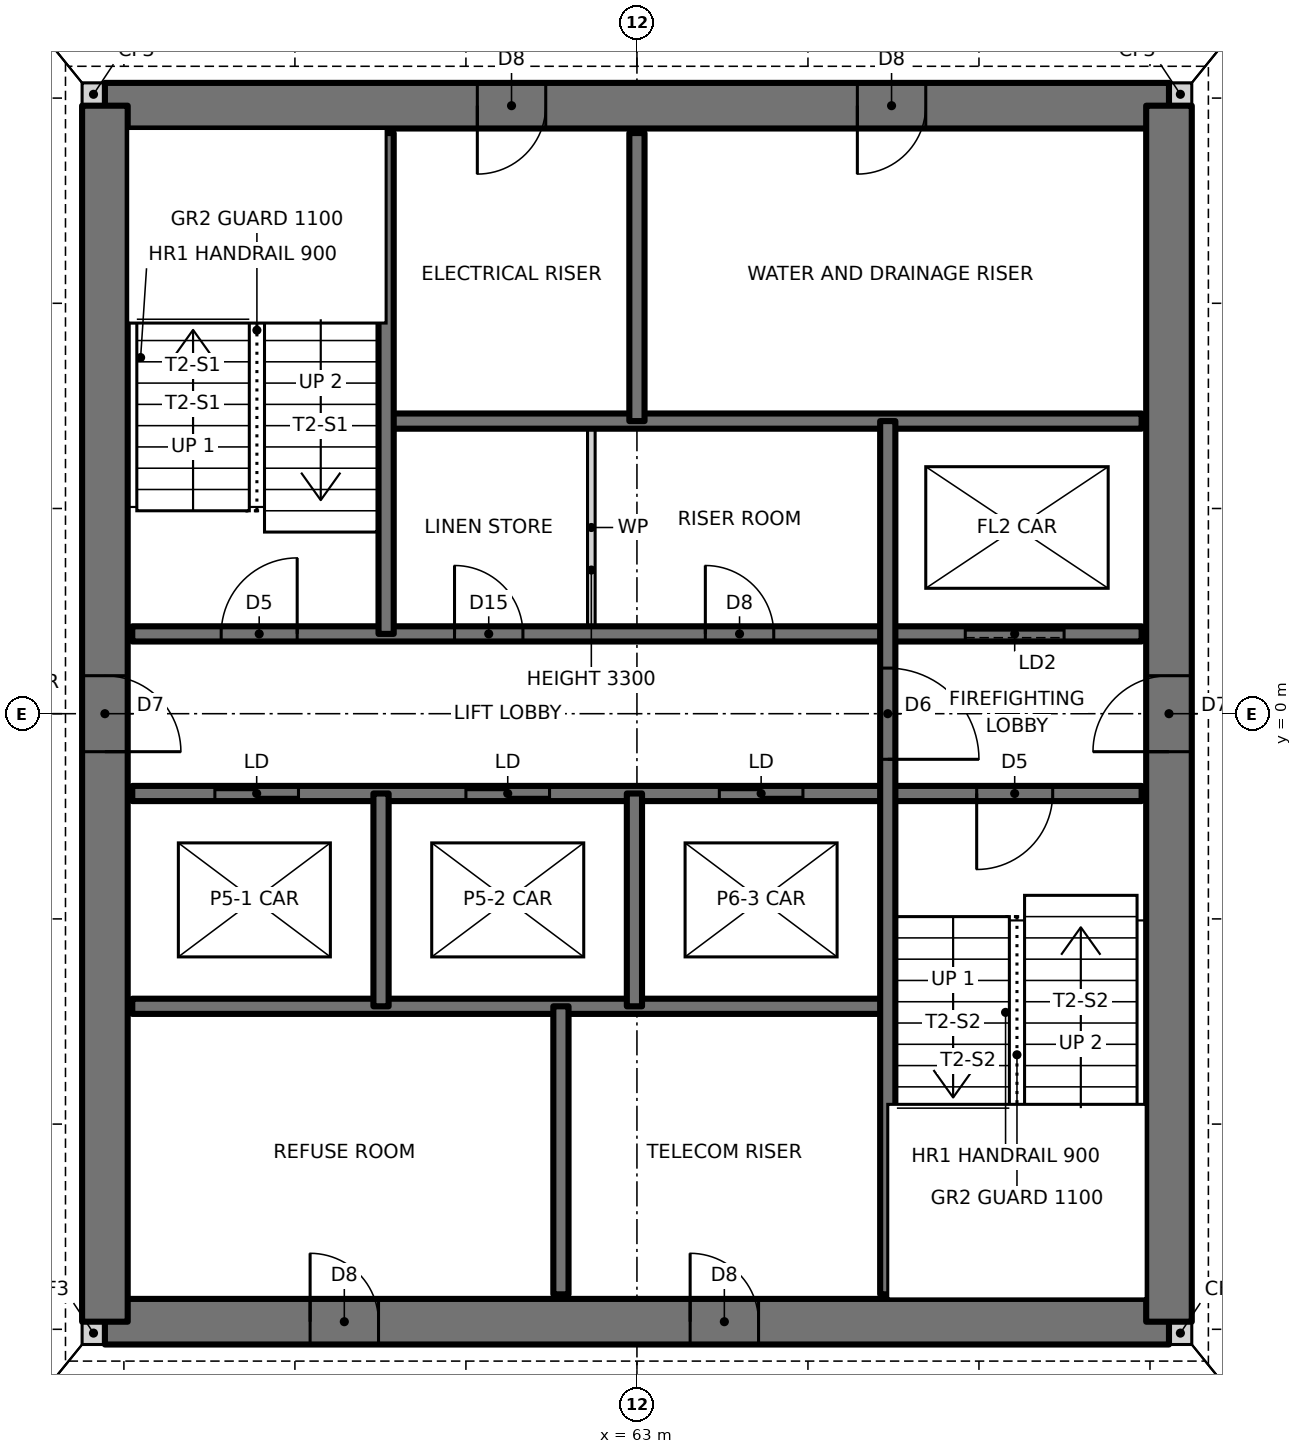
"""IFC4 building model, lengths in metres.
Left out: names, types, materials, properties, quantities, classifications, styles, units other than length and angle.
Written with IfcOpenShell. Run it as: python <this file> out.ifc"""

import sys

from ifc_helpers import new_model, si_unit, direction, frame, frame_2d, origin, place, context, subcontext, project, spatial, rectangle, extrude, element, fill, save


model = new_model("IFC4")
c1 = context("Model", 3, precision=1e-05, world=origin(), true_north=direction((0.0, 1.0)))
c2 = subcontext(c1, "Body", "Model", "MODEL_VIEW")
j1 = project(units=[si_unit("LENGTHUNIT", "METRE"), si_unit("PLANEANGLEUNIT", "RADIAN")], contexts=[c1])
p1 = place(None, origin())
s1 = spatial("IfcSite", under=j1, at=p1, CompositionType="ELEMENT")
p2 = place(p1, origin())
s2 = spatial("IfcBuilding", under=s1, at=p2, CompositionType="ELEMENT")
p3 = place(p2, frame((0.0, 0.0, 126.0)))
s3 = spatial("IfcBuildingStorey", under=s2, at=p3, CompositionType="ELEMENT", Elevation=126.0)
for number, where, z_axis, x_axis in (
    (1, (55.7, -8.15, 0.0), (0.0, 0.0, 1.0), (1.0, 0.0, 0.0)),
    (2, (70.0, -8.15, 0.0), (0.0, 0.0, 1.0), (1.0, 0.0, 0.0)),
    (3, (70.0, 8.15, 0.0), (0.0, 0.0, 1.0), (1.0, 0.0, 0.0)),
    (4, (55.7, 8.15, 0.0), (0.0, 0.0, 1.0), (1.0, 0.0, 0.0)),
):
    element("IfcWall", number, at=place(p3, frame(where, z_axis=z_axis, x_axis=x_axis)), inside=s3, PredefinedType="SOLIDWALL", context=c2, shape_type="SweptSolid", body=[
        extrude(rectangle(XDim=0.3, YDim=0.3, at=frame_2d((0.15, 0.0))), origin(), (0.0, 0.0, 1.0), 3.5),
    ])
p4 = place(p3, frame((56.0, -8.0, 0.0), z_axis=(0.0, 0.0, 1.0), x_axis=(1.0, 0.0, 0.0)))
e5 = element("IfcWall", 5, at=p4, inside=s3, PredefinedType="SHEAR", context=c2, shape_type="SweptSolid", body=[
    extrude(rectangle(XDim=14.0, YDim=0.6, at=frame_2d((7.0, 0.0))), origin(), (0.0, 0.0, 1.0), 3.5),
])
p5 = place(p4, frame((2.7, 0.0, 0.0)))
e6 = element("IfcOpeningElement", 6, at=p5, cuts=e5, PredefinedType="OPENING", context=c2, shape_type="SweptSolid", body=[
    extrude(rectangle(XDim=0.9, YDim=2.1, at=frame_2d((0.45, 1.05))), frame((0.0, 0.31, 0.0), z_axis=(0.0, -1.0, 0.0), x_axis=(1.0, 0.0, 0.0)), (0.0, 0.0, 1.0), 0.62),
])
p6 = place(p4, frame((7.7, 0.0, 0.0)))
e7 = element("IfcOpeningElement", 7, at=p6, cuts=e5, PredefinedType="OPENING", context=c2, shape_type="SweptSolid", body=[
    extrude(rectangle(XDim=0.9, YDim=2.1, at=frame_2d((0.45, 1.05))), frame((0.0, 0.31, 0.0), z_axis=(0.0, -1.0, 0.0), x_axis=(1.0, 0.0, 0.0)), (0.0, 0.0, 1.0), 0.62),
])
p7 = place(p3, frame((70.0, 8.0, 0.0), z_axis=(0.0, 0.0, 1.0), x_axis=(-1.0, 0.0, 0.0)))
e8 = element("IfcWall", 8, at=p7, inside=s3, PredefinedType="SHEAR", context=c2, shape_type="SweptSolid", body=[
    extrude(rectangle(XDim=14.0, YDim=0.6, at=frame_2d((7.0, 0.0))), origin(), (0.0, 0.0, 1.0), 3.5),
])
p8 = place(p7, frame((8.2, 0.0, 0.0)))
e9 = element("IfcOpeningElement", 9, at=p8, cuts=e8, PredefinedType="OPENING", context=c2, shape_type="SweptSolid", body=[
    extrude(rectangle(XDim=0.9, YDim=2.1, at=frame_2d((0.45, 1.05))), frame((0.0, 0.31, 0.0), z_axis=(0.0, -1.0, 0.0), x_axis=(1.0, 0.0, 0.0)), (0.0, 0.0, 1.0), 0.62),
])
p9 = place(p7, frame((3.2, 0.0, 0.0)))
e10 = element("IfcOpeningElement", 10, at=p9, cuts=e8, PredefinedType="OPENING", context=c2, shape_type="SweptSolid", body=[
    extrude(rectangle(XDim=0.9, YDim=2.1, at=frame_2d((0.45, 1.05))), frame((0.0, 0.31, 0.0), z_axis=(0.0, -1.0, 0.0), x_axis=(1.0, 0.0, 0.0)), (0.0, 0.0, 1.0), 0.62),
])
p10 = place(p3, frame((70.0, -8.0, 0.0), z_axis=(0.0, 0.0, 1.0), x_axis=(0.0, 1.0, 0.0)))
e11 = element("IfcWall", 11, at=p10, inside=s3, PredefinedType="SHEAR", context=c2, shape_type="SweptSolid", body=[
    extrude(rectangle(XDim=16.0, YDim=0.6, at=frame_2d((8.0, 0.0))), origin(), (0.0, 0.0, 1.0), 3.5),
])
p11 = place(p10, frame((7.5, 0.0, 0.0)))
e12 = element("IfcOpeningElement", 12, at=p11, cuts=e11, PredefinedType="OPENING", context=c2, shape_type="SweptSolid", body=[
    extrude(rectangle(XDim=1.0, YDim=2.1, at=frame_2d((0.5, 1.05))), frame((0.0, 0.31, 0.0), z_axis=(0.0, -1.0, 0.0), x_axis=(1.0, 0.0, 0.0)), (0.0, 0.0, 1.0), 0.62),
])
p12 = place(p3, frame((56.0, 8.0, 0.0), z_axis=(0.0, 0.0, 1.0), x_axis=(0.0, -1.0, 0.0)))
e13 = element("IfcWall", 13, at=p12, inside=s3, PredefinedType="SHEAR", context=c2, shape_type="SweptSolid", body=[
    extrude(rectangle(XDim=16.0, YDim=0.6, at=frame_2d((8.0, 0.0))), origin(), (0.0, 0.0, 1.0), 3.5),
])
p13 = place(p12, frame((7.5, 0.0, 0.0)))
e14 = element("IfcOpeningElement", 14, at=p13, cuts=e13, PredefinedType="OPENING", context=c2, shape_type="SweptSolid", body=[
    extrude(rectangle(XDim=1.0, YDim=2.1, at=frame_2d((0.5, 1.05))), frame((0.0, 0.31, 0.0), z_axis=(0.0, -1.0, 0.0), x_axis=(1.0, 0.0, 0.0)), (0.0, 0.0, 1.0), 0.62),
])
p14 = place(p3, frame((56.36, -3.85, 0.0), z_axis=(0.0, 0.0, 1.0), x_axis=(1.0, 0.0, 0.0)))
e15 = element("IfcWall", 15, at=p14, inside=s3, PredefinedType="SOLIDWALL", context=c2, shape_type="SweptSolid", body=[
    extrude(rectangle(XDim=9.94, YDim=0.2, at=frame_2d((4.97, 0.0))), origin(), (0.0, 0.0, 1.0), 3.5),
])
p15 = place(p3, frame((56.36, -1.05, 0.0), z_axis=(0.0, 0.0, 1.0), x_axis=(1.0, 0.0, 0.0)))
e16 = element("IfcWall", 16, at=p15, inside=s3, PredefinedType="SOLIDWALL", context=c2, shape_type="SweptSolid", body=[
    extrude(rectangle(XDim=13.28, YDim=0.2, at=frame_2d((6.64, 0.0))), origin(), (0.0, 0.0, 1.0), 3.5),
])
p16 = place(p15, frame((11.11, 0.0, 0.0)))
e17 = element("IfcOpeningElement", 17, at=p16, cuts=e16, PredefinedType="OPENING", context=c2, shape_type="SweptSolid", body=[
    extrude(rectangle(XDim=1.0, YDim=2.1, at=frame_2d((0.5, 1.05))), frame((0.0, 0.11, 0.0), z_axis=(0.0, -1.0, 0.0), x_axis=(1.0, 0.0, 0.0)), (0.0, 0.0, 1.0), 0.22),
])
p17 = place(p15, frame((1.087, 0.0, 0.0)))
e18 = element("IfcOpeningElement", 18, at=p17, cuts=e16, PredefinedType="OPENING", context=c2, shape_type="SweptSolid", body=[
    extrude(rectangle(XDim=1.1, YDim=2.1, at=frame_2d((0.55, 1.05))), frame((0.0, 0.11, 0.0), z_axis=(0.0, -1.0, 0.0), x_axis=(1.0, 0.0, 0.0)), (0.0, 0.0, 1.0), 0.22),
])
p18 = place(p15, frame((4.39, 0.0, 0.0)))
e19 = element("IfcOpeningElement", 19, at=p18, cuts=e16, PredefinedType="OPENING", context=c2, shape_type="SweptSolid", body=[
    extrude(rectangle(XDim=1.1, YDim=2.1, at=frame_2d((0.55, 1.05))), frame((0.0, 0.11, 0.0), z_axis=(0.0, -1.0, 0.0), x_axis=(1.0, 0.0, 0.0)), (0.0, 0.0, 1.0), 0.22),
])
p19 = place(p15, frame((7.724, 0.0, 0.0)))
e20 = element("IfcOpeningElement", 20, at=p19, cuts=e16, PredefinedType="OPENING", context=c2, shape_type="SweptSolid", body=[
    extrude(rectangle(XDim=1.1, YDim=2.1, at=frame_2d((0.55, 1.05))), frame((0.0, 0.11, 0.0), z_axis=(0.0, -1.0, 0.0), x_axis=(1.0, 0.0, 0.0)), (0.0, 0.0, 1.0), 0.22),
])
p20 = place(p3, frame((56.36, 1.05, 0.0), z_axis=(0.0, 0.0, 1.0), x_axis=(1.0, 0.0, 0.0)))
e21 = element("IfcWall", 21, at=p20, inside=s3, PredefinedType="SOLIDWALL", context=c2, shape_type="SweptSolid", body=[
    extrude(rectangle(XDim=13.28, YDim=0.2, at=frame_2d((6.64, 0.0))), origin(), (0.0, 0.0, 1.0), 3.5),
])
p21 = place(p20, frame((1.17, 0.0, 0.0)))
e22 = element("IfcOpeningElement", 22, at=p21, cuts=e21, PredefinedType="OPENING", context=c2, shape_type="SweptSolid", body=[
    extrude(rectangle(XDim=1.0, YDim=2.1, at=frame_2d((0.5, 1.05))), frame((0.0, 0.11, 0.0), z_axis=(0.0, -1.0, 0.0), x_axis=(1.0, 0.0, 0.0)), (0.0, 0.0, 1.0), 0.22),
])
p22 = place(p20, frame((7.54, 0.0, 0.0)))
e23 = element("IfcOpeningElement", 23, at=p22, cuts=e21, PredefinedType="OPENING", context=c2, shape_type="SweptSolid", body=[
    extrude(rectangle(XDim=0.9, YDim=2.1, at=frame_2d((0.45, 1.05))), frame((0.0, 0.11, 0.0), z_axis=(0.0, -1.0, 0.0), x_axis=(1.0, 0.0, 0.0)), (0.0, 0.0, 1.0), 0.22),
])
p23 = place(p20, frame((4.24, 0.0, 0.0)))
e24 = element("IfcOpeningElement", 24, at=p23, cuts=e21, PredefinedType="OPENING", context=c2, shape_type="SweptSolid", body=[
    extrude(rectangle(XDim=0.9, YDim=2.1, at=frame_2d((0.45, 1.05))), frame((0.0, 0.11, 0.0), z_axis=(0.0, -1.0, 0.0), x_axis=(1.0, 0.0, 0.0)), (0.0, 0.0, 1.0), 0.22),
])
p24 = place(p20, frame((10.96, 0.0, 0.0)))
e25 = element("IfcOpeningElement", 25, at=p24, cuts=e21, PredefinedType="OPENING", context=c2, shape_type="SweptSolid", body=[
    extrude(rectangle(XDim=1.3, YDim=2.1, at=frame_2d((0.65, 1.05))), frame((0.0, 0.11, 0.0), z_axis=(0.0, -1.0, 0.0), x_axis=(1.0, 0.0, 0.0)), (0.0, 0.0, 1.0), 0.22),
])
p25 = place(p3, frame((59.7, 3.85, 0.0), z_axis=(0.0, 0.0, 1.0), x_axis=(1.0, 0.0, 0.0)))
e26 = element("IfcWall", 26, at=p25, inside=s3, PredefinedType="SOLIDWALL", context=c2, shape_type="SweptSolid", body=[
    extrude(rectangle(XDim=9.94, YDim=0.2, at=frame_2d((4.97, 0.0))), origin(), (0.0, 0.0, 1.0), 3.5),
])
p26 = place(p3, frame((66.3, -7.64, 0.0), z_axis=(0.0, 0.0, 1.0), x_axis=(0.0, 1.0, 0.0)))
e27 = element("IfcWall", 27, at=p26, inside=s3, PredefinedType="SOLIDWALL", context=c2, shape_type="SweptSolid", body=[
    extrude(rectangle(XDim=11.49, YDim=0.2, at=frame_2d((5.745, 0.0))), origin(), (0.0, 0.0, 1.0), 3.5),
])
p27 = place(p26, frame((7.04, 0.0, 0.0)))
e28 = element("IfcOpeningElement", 28, at=p27, cuts=e27, PredefinedType="OPENING", context=c2, shape_type="SweptSolid", body=[
    extrude(rectangle(XDim=1.2, YDim=2.1, at=frame_2d((0.6, 1.05))), frame((0.0, 0.11, 0.0), z_axis=(0.0, -1.0, 0.0), x_axis=(1.0, 0.0, 0.0)), (0.0, 0.0, 1.0), 0.22),
])
p28 = place(p3, frame((63.0, 3.85, 0.0), z_axis=(0.0, 0.0, 1.0), x_axis=(0.0, 1.0, 0.0)))
e29 = element("IfcWall", 29, at=p28, inside=s3, PredefinedType="SOLIDWALL", context=c2, shape_type="SweptSolid", body=[
    extrude(rectangle(XDim=3.79, YDim=0.2, at=frame_2d((1.895, 0.0))), origin(), (0.0, 0.0, 1.0), 3.5),
])
p29 = place(p3, frame((62.967, -3.85, 0.0), z_axis=(0.0, 0.0, 1.0), x_axis=(0.0, 1.0, 0.0)))
e30 = element("IfcWall", 30, at=p29, inside=s3, PredefinedType="SOLIDWALL", context=c2, shape_type="SweptSolid", body=[
    extrude(rectangle(XDim=2.8, YDim=0.2, at=frame_2d((1.4, 0.0))), origin(), (0.0, 0.0, 1.0), 3.5),
])
p30 = place(p3, frame((62.4, 1.05, 0.0), z_axis=(0.0, 0.0, 1.0), x_axis=(0.0, 1.0, 0.0)))
e31 = element("IfcWall", 31, at=p30, inside=s3, PredefinedType="PARTITIONING", context=c2, shape_type="SweptSolid", body=[
    extrude(rectangle(XDim=2.8, YDim=0.1, at=frame_2d((1.4, 0.0))), origin(), (0.0, 0.0, 1.0), 3.3),
])
p31 = place(p3, frame((62.0, -7.64, 0.0), z_axis=(0.0, 0.0, 1.0), x_axis=(0.0, 1.0, 0.0)))
e32 = element("IfcWall", 32, at=p31, inside=s3, PredefinedType="SOLIDWALL", context=c2, shape_type="SweptSolid", body=[
    extrude(rectangle(XDim=3.79, YDim=0.2, at=frame_2d((1.895, 0.0))), origin(), (0.0, 0.0, 1.0), 3.5),
])
p32 = place(p3, frame((59.7, 1.05, 0.0), z_axis=(0.0, 0.0, 1.0), x_axis=(0.0, 1.0, 0.0)))
e33 = element("IfcWall", 33, at=p32, inside=s3, PredefinedType="SOLIDWALL", context=c2, shape_type="SweptSolid", body=[
    extrude(rectangle(XDim=6.59, YDim=0.2, at=frame_2d((3.295, 0.0))), origin(), (0.0, 0.0, 1.0), 3.5),
])
p33 = place(p3, frame((59.633, -3.85, 0.0), z_axis=(0.0, 0.0, 1.0), x_axis=(0.0, 1.0, 0.0)))
e34 = element("IfcWall", 34, at=p33, inside=s3, PredefinedType="SOLIDWALL", context=c2, shape_type="SweptSolid", body=[
    extrude(rectangle(XDim=2.8, YDim=0.2, at=frame_2d((1.4, 0.0))), origin(), (0.0, 0.0, 1.0), 3.5),
])
p34 = place(p21, origin())
e35 = element("IfcDoor", 35, at=p34, inside=s3, OperationType="SINGLE_SWING_RIGHT", PredefinedType="DOOR", context=c2, shape_type="SweptSolid", body=[
    extrude(rectangle(XDim=1.0, YDim=2.1, at=frame_2d((0.5, 1.05))), frame((0.0, 0.025, 0.0), z_axis=(0.0, -1.0, 0.0), x_axis=(1.0, 0.0, 0.0)), (0.0, 0.0, 1.0), 0.05),
])
fill(e22, e35)
p35 = place(p16, frame((1.0, 0.0, 0.0), z_axis=(0.0, 0.0, 1.0), x_axis=(-1.0, 0.0, 0.0)))
e36 = element("IfcDoor", 36, at=p35, inside=s3, OperationType="SINGLE_SWING_RIGHT", PredefinedType="DOOR", context=c2, shape_type="SweptSolid", body=[
    extrude(rectangle(XDim=1.0, YDim=2.1, at=frame_2d((0.5, 1.05))), frame((0.0, 0.025, 0.0), z_axis=(0.0, -1.0, 0.0), x_axis=(1.0, 0.0, 0.0)), (0.0, 0.0, 1.0), 0.05),
])
fill(e17, e36)
p36 = place(p27, frame((1.2, 0.0, 0.0), z_axis=(0.0, 0.0, 1.0), x_axis=(-1.0, 0.0, 0.0)))
e37 = element("IfcDoor", 37, at=p36, inside=s3, OperationType="SINGLE_SWING_RIGHT", PredefinedType="DOOR", context=c2, shape_type="SweptSolid", body=[
    extrude(rectangle(XDim=1.2, YDim=2.1, at=frame_2d((0.6, 1.05))), frame((0.0, 0.025, 0.0), z_axis=(0.0, -1.0, 0.0), x_axis=(1.0, 0.0, 0.0)), (0.0, 0.0, 1.0), 0.05),
])
fill(e28, e37)
p37 = place(p22, origin())
e38 = element("IfcDoor", 38, at=p37, inside=s3, OperationType="SINGLE_SWING_LEFT", PredefinedType="DOOR", context=c2, shape_type="SweptSolid", body=[
    extrude(rectangle(XDim=0.9, YDim=2.1, at=frame_2d((0.45, 1.05))), frame((0.0, 0.025, 0.0), z_axis=(0.0, -1.0, 0.0), x_axis=(1.0, 0.0, 0.0)), (0.0, 0.0, 1.0), 0.05),
])
fill(e23, e38)
p38 = place(p23, origin())
e39 = element("IfcDoor", 39, at=p38, inside=s3, OperationType="SINGLE_SWING_LEFT", PredefinedType="DOOR", context=c2, shape_type="SweptSolid", body=[
    extrude(rectangle(XDim=0.9, YDim=2.1, at=frame_2d((0.45, 1.05))), frame((0.0, 0.025, 0.0), z_axis=(0.0, -1.0, 0.0), x_axis=(1.0, 0.0, 0.0)), (0.0, 0.0, 1.0), 0.05),
])
fill(e24, e39)
p39 = place(p13, origin())
e40 = element("IfcDoor", 40, at=p39, inside=s3, OperationType="SINGLE_SWING_RIGHT", PredefinedType="DOOR", context=c2, shape_type="SweptSolid", body=[
    extrude(rectangle(XDim=1.0, YDim=2.1, at=frame_2d((0.5, 1.05))), frame((0.0, 0.025, 0.0), z_axis=(0.0, -1.0, 0.0), x_axis=(1.0, 0.0, 0.0)), (0.0, 0.0, 1.0), 0.05),
])
fill(e14, e40)
p40 = place(p11, origin())
e41 = element("IfcDoor", 41, at=p40, inside=s3, OperationType="SINGLE_SWING_LEFT", PredefinedType="DOOR", context=c2, shape_type="SweptSolid", body=[
    extrude(rectangle(XDim=1.0, YDim=2.1, at=frame_2d((0.5, 1.05))), frame((0.0, 0.025, 0.0), z_axis=(0.0, -1.0, 0.0), x_axis=(1.0, 0.0, 0.0)), (0.0, 0.0, 1.0), 0.05),
])
fill(e12, e41)
p41 = place(p8, origin())
e42 = element("IfcDoor", 42, at=p41, inside=s3, OperationType="SINGLE_SWING_RIGHT", PredefinedType="DOOR", context=c2, shape_type="SweptSolid", body=[
    extrude(rectangle(XDim=0.9, YDim=2.1, at=frame_2d((0.45, 1.05))), frame((0.0, 0.025, 0.0), z_axis=(0.0, -1.0, 0.0), x_axis=(1.0, 0.0, 0.0)), (0.0, 0.0, 1.0), 0.05),
])
fill(e9, e42)
p42 = place(p9, origin())
e43 = element("IfcDoor", 43, at=p42, inside=s3, OperationType="SINGLE_SWING_RIGHT", PredefinedType="DOOR", context=c2, shape_type="SweptSolid", body=[
    extrude(rectangle(XDim=0.9, YDim=2.1, at=frame_2d((0.45, 1.05))), frame((0.0, 0.025, 0.0), z_axis=(0.0, -1.0, 0.0), x_axis=(1.0, 0.0, 0.0)), (0.0, 0.0, 1.0), 0.05),
])
fill(e10, e43)
p43 = place(p5, origin())
e44 = element("IfcDoor", 44, at=p43, inside=s3, OperationType="SINGLE_SWING_LEFT", PredefinedType="DOOR", context=c2, shape_type="SweptSolid", body=[
    extrude(rectangle(XDim=0.9, YDim=2.1, at=frame_2d((0.45, 1.05))), frame((0.0, 0.025, 0.0), z_axis=(0.0, -1.0, 0.0), x_axis=(1.0, 0.0, 0.0)), (0.0, 0.0, 1.0), 0.05),
])
fill(e6, e44)
p44 = place(p6, origin())
e45 = element("IfcDoor", 45, at=p44, inside=s3, OperationType="SINGLE_SWING_LEFT", PredefinedType="DOOR", context=c2, shape_type="SweptSolid", body=[
    extrude(rectangle(XDim=0.9, YDim=2.1, at=frame_2d((0.45, 1.05))), frame((0.0, 0.025, 0.0), z_axis=(0.0, -1.0, 0.0), x_axis=(1.0, 0.0, 0.0)), (0.0, 0.0, 1.0), 0.05),
])
fill(e7, e45)
p45 = place(p17, origin())
e46 = element("IfcDoor", 46, at=p45, inside=s3, OperationType="DOUBLE_DOOR_SLIDING", PredefinedType="DOOR", context=c2, shape_type="SweptSolid", body=[
    extrude(rectangle(XDim=1.1, YDim=2.1, at=frame_2d((0.55, 1.05))), frame((0.0, 0.025, 0.0), z_axis=(0.0, -1.0, 0.0), x_axis=(1.0, 0.0, 0.0)), (0.0, 0.0, 1.0), 0.05),
])
fill(e18, e46)
p46 = place(p18, origin())
e47 = element("IfcDoor", 47, at=p46, inside=s3, OperationType="DOUBLE_DOOR_SLIDING", PredefinedType="DOOR", context=c2, shape_type="SweptSolid", body=[
    extrude(rectangle(XDim=1.1, YDim=2.1, at=frame_2d((0.55, 1.05))), frame((0.0, 0.025, 0.0), z_axis=(0.0, -1.0, 0.0), x_axis=(1.0, 0.0, 0.0)), (0.0, 0.0, 1.0), 0.05),
])
fill(e19, e47)
p47 = place(p19, origin())
e48 = element("IfcDoor", 48, at=p47, inside=s3, OperationType="DOUBLE_DOOR_SLIDING", PredefinedType="DOOR", context=c2, shape_type="SweptSolid", body=[
    extrude(rectangle(XDim=1.1, YDim=2.1, at=frame_2d((0.55, 1.05))), frame((0.0, 0.025, 0.0), z_axis=(0.0, -1.0, 0.0), x_axis=(1.0, 0.0, 0.0)), (0.0, 0.0, 1.0), 0.05),
])
fill(e20, e48)
p48 = place(p24, origin())
e49 = element("IfcDoor", 49, at=p48, inside=s3, OperationType="SLIDING_TO_LEFT", PredefinedType="DOOR", context=c2, shape_type="SweptSolid", body=[
    extrude(rectangle(XDim=1.3, YDim=2.1, at=frame_2d((0.65, 1.05))), frame((0.0, 0.025, 0.0), z_axis=(0.0, -1.0, 0.0), x_axis=(1.0, 0.0, 0.0)), (0.0, 0.0, 1.0), 0.05),
])
fill(e25, e49)
save(model, sys.argv[1])
